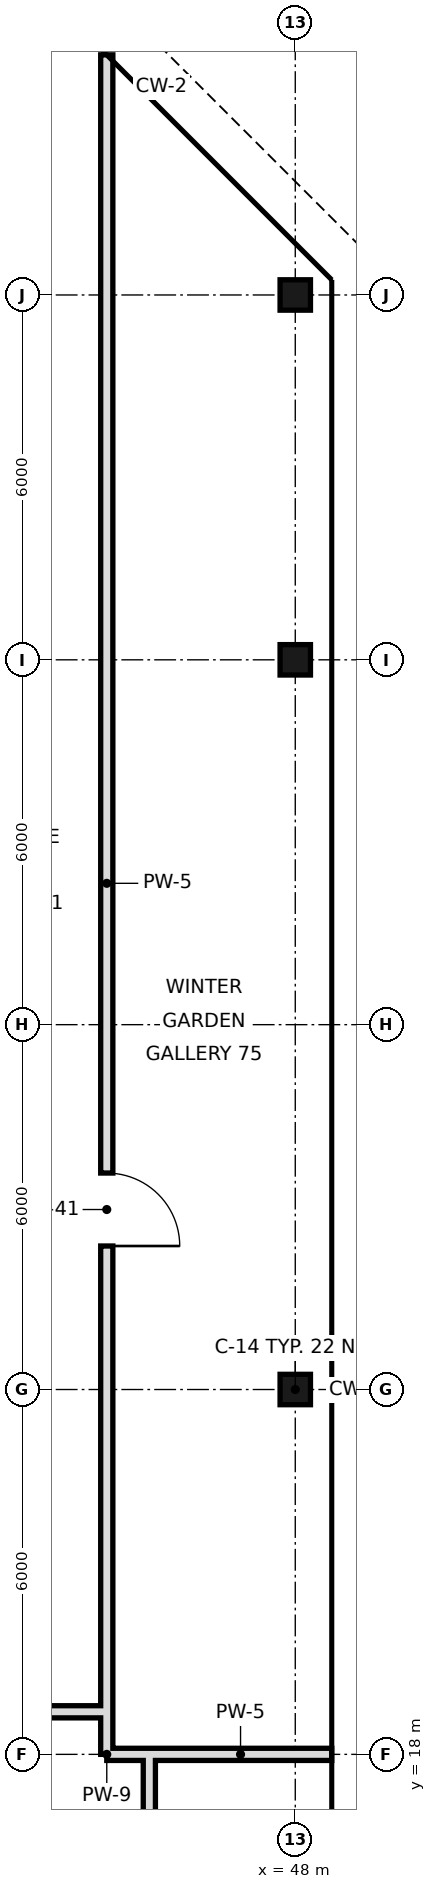
"""IFC4 building model, lengths in metres.
Left out: names, types, materials, properties, quantities, classifications, styles, units other than length and angle.
Written with IfcOpenShell. Run it as: python <this file> out.ifc"""

import sys

from ifc_helpers import new_model, si_unit, direction, frame, frame_2d, origin, origin_2d, place, context, subcontext, project, spatial, rectangle, hollow_rectangle, extrude, element, fill, save


model = new_model("IFC4")
c1 = context("Model", 3, precision=1e-05, world=origin(), true_north=direction((0.0, 1.0)))
c2 = subcontext(c1, "Body", "Model", "MODEL_VIEW")
j1 = project(units=[si_unit("LENGTHUNIT", "METRE"), si_unit("PLANEANGLEUNIT", "RADIAN")], contexts=[c1])
p1 = place(None, origin())
s1 = spatial("IfcSite", under=j1, at=p1, CompositionType="ELEMENT")
p2 = place(p1, origin())
s2 = spatial("IfcBuilding", under=s1, at=p2, CompositionType="ELEMENT")
p3 = place(p2, frame((0.0, 0.0, 316.0)))
s3 = spatial("IfcBuildingStorey", under=s2, at=p3, CompositionType="ELEMENT", Elevation=316.0)
for number, where, z_axis, x_axis in (
    (1, (48.0, 24.0, 0.0), (0.0, 0.0, 1.0), (1.0, 0.0, 0.0)),
    (2, (48.0, 36.0, 0.0), (0.0, 0.0, 1.0), (1.0, 0.0, 0.0)),
    (3, (48.0, 42.0, 0.0), (0.0, 0.0, 1.0), (1.0, 0.0, 0.0)),
):
    element("IfcColumn", number, at=place(p3, frame(where, z_axis=z_axis, x_axis=x_axis)), inside=s3, PredefinedType="COLUMN", context=c2, shape_type="SweptSolid", body=[
        extrude(hollow_rectangle(XDim=0.5, YDim=0.5, WallThickness=0.025, at=origin_2d()), origin(), (0.0, 0.0, 1.0), 3.6),
    ])
p4 = place(p3, frame((44.9, 18.7, 0.0), z_axis=(0.0, 0.0, 1.0), x_axis=(0.0, 1.0, 0.0)))
e4 = element("IfcWall", 4, at=p4, inside=s3, PredefinedType="SOLIDWALL", context=c2, shape_type="SweptSolid", body=[
    extrude(rectangle(XDim=27.249, YDim=0.2, at=frame_2d((13.625, 0.0))), origin(), (0.0, 0.0, 1.0), 2.97),
])
p5 = place(p4, frame((7.66, 0.0, 0.0)))
e5 = element("IfcOpeningElement", 5, at=p5, cuts=e4, PredefinedType="OPENING", context=c2, shape_type="SweptSolid", body=[
    extrude(rectangle(XDim=1.2, YDim=2.4, at=frame_2d((0.6, 1.2))), frame((0.0, 0.11, 0.0), z_axis=(0.0, -1.0, 0.0), x_axis=(1.0, 0.0, 0.0)), (0.0, 0.0, 1.0), 0.22),
])
p6 = place(p3, frame((44.9, 18.0, 0.0), z_axis=(0.0, 0.0, 1.0), x_axis=(0.0, 1.0, 0.0)))
e6 = element("IfcWall", 6, at=p6, inside=s3, PredefinedType="SOLIDWALL", context=c2, shape_type="SweptSolid", body=[
    extrude(rectangle(XDim=0.7, YDim=0.2, at=frame_2d((0.35, 0.0))), origin(), (0.0, 0.0, 1.0), 2.97),
])
p7 = place(p3, frame((45.6, 10.8, 0.0), z_axis=(0.0, 0.0, 1.0), x_axis=(0.0, 1.0, 0.0)))
e7 = element("IfcWall", 7, at=p7, inside=s3, PredefinedType="SOLIDWALL", context=c2, shape_type="SweptSolid", body=[
    extrude(rectangle(XDim=7.2, YDim=0.2, at=frame_2d((3.6, 0.0))), origin(), (0.0, 0.0, 1.0), 2.72),
])
p8 = place(p3, frame((45.6, 18.0, 0.0), z_axis=(0.0, 0.0, 1.0), x_axis=(1.0, 0.0, 0.0)))
e8 = element("IfcWall", 8, at=p8, inside=s3, PredefinedType="SOLIDWALL", context=c2, shape_type="SweptSolid", body=[
    extrude(rectangle(XDim=3.0, YDim=0.2, at=frame_2d((1.5, 0.0))), origin(), (0.0, 0.0, 1.0), 2.72),
])
p9 = place(p3, frame((44.9, 18.0, 0.0), z_axis=(0.0, 0.0, 1.0), x_axis=(1.0, 0.0, 0.0)))
e9 = element("IfcWall", 9, at=p9, inside=s3, PredefinedType="SOLIDWALL", context=c2, shape_type="SweptSolid", body=[
    extrude(rectangle(XDim=0.7, YDim=0.2, at=frame_2d((0.35, 0.0))), origin(), (0.0, 0.0, 1.0), 2.97),
])
p10 = place(p3, frame((40.2, 18.7, 0.0), z_axis=(0.0, 0.0, 1.0), x_axis=(1.0, 0.0, 0.0)))
e10 = element("IfcWall", 10, at=p10, inside=s3, PredefinedType="SOLIDWALL", context=c2, shape_type="SweptSolid", body=[
    extrude(rectangle(XDim=4.7, YDim=0.2, at=frame_2d((2.35, 0.0))), origin(), (0.0, 0.0, 1.0), 2.72),
])
p11 = place(p5, frame((1.2, 0.0, 0.0), z_axis=(0.0, 0.0, 1.0), x_axis=(-1.0, 0.0, 0.0)))
e11 = element("IfcDoor", 11, at=p11, inside=s3, OperationType="SINGLE_SWING_RIGHT", PredefinedType="DOOR", context=c2, shape_type="SweptSolid", body=[
    extrude(rectangle(XDim=1.2, YDim=2.4, at=frame_2d((0.6, 1.2))), frame((0.0, 0.025, 0.0), z_axis=(0.0, -1.0, 0.0), x_axis=(1.0, 0.0, 0.0)), (0.0, 0.0, 1.0), 0.05),
])
fill(e5, e11)
save(model, sys.argv[1])
